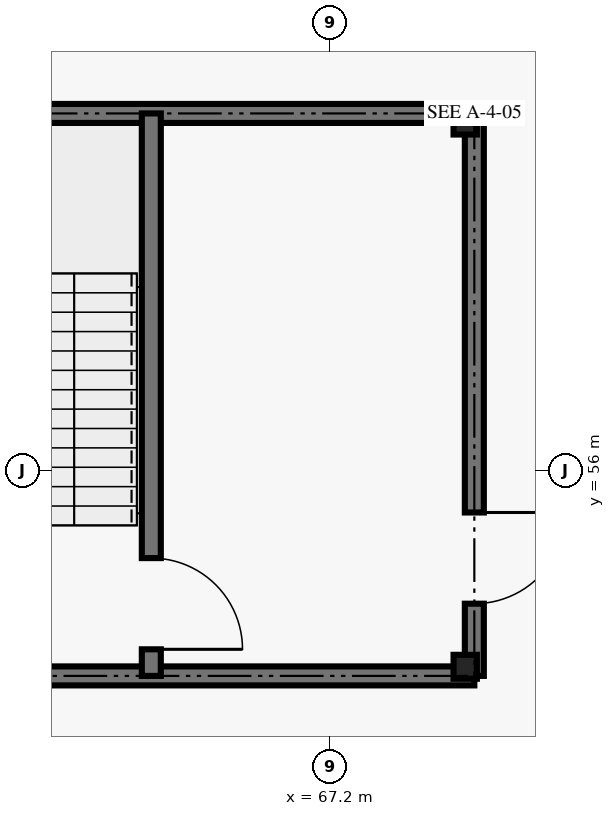
"""IFC4 building model, lengths in metres.
Left out: names, types, materials, properties, quantities, classifications, styles, units other than length and angle.
Written with IfcOpenShell. Run it as: python <this file> out.ifc"""

import sys

from ifc_helpers import new_model, si_unit, direction, frame, frame_2d, origin, origin_2d, place, context, subcontext, project, spatial, rectangle, i_section, extrude, element, fill, save


model = new_model("IFC4")
c1 = context("Model", 3, precision=1e-05, world=origin(), true_north=direction((0.0, 1.0)))
c2 = subcontext(c1, "Body", "Model", "MODEL_VIEW")
j1 = project(units=[si_unit("LENGTHUNIT", "METRE"), si_unit("PLANEANGLEUNIT", "RADIAN")], contexts=[c1])
p1 = place(None, origin())
s1 = spatial("IfcSite", under=j1, at=p1, CompositionType="ELEMENT")
p2 = place(p1, origin())
s2 = spatial("IfcBuilding", under=s1, at=p2, CompositionType="ELEMENT")
p3 = place(p2, frame((0.0, 0.0, 5.4)))
s3 = spatial("IfcBuildingStorey", under=s2, at=p3, CompositionType="ELEMENT", Elevation=5.4)
for number, where, z_axis, x_axis in (
    (1, (68.98, 53.42, 0.0), (0.0, 0.0, 1.0), (1.0, 0.0, 0.0)),
    (2, (68.98, 60.58, 0.0), (0.0, 0.0, 1.0), (1.0, 0.0, 0.0)),
):
    element("IfcColumn", number, at=place(p3, frame(where, z_axis=z_axis, x_axis=x_axis)), inside=s3, PredefinedType="COLUMN", context=c2, shape_type="SweptSolid", body=[
        extrude(i_section(OverallWidth=0.307, OverallDepth=0.315, WebThickness=0.012, FlangeThickness=0.019, FilletRadius=0.017, at=origin_2d()), origin(), (0.0, 0.0, 1.0), 4.8),
    ])
for number, where, z_axis, x_axis in (
    (3, (59.9, 60.7, 0.0), (0.0, 0.0, 1.0), (1.0, 0.0, 0.0)),
    (4, (69.1, 53.3, 0.0), (0.0, 0.0, 1.0), (-1.0, 0.0, 0.0)),
):
    element("IfcWall", number, at=place(p3, frame(where, z_axis=z_axis, x_axis=x_axis)), inside=s3, PredefinedType="SHEAR", context=c2, shape_type="SweptSolid", body=[
        extrude(rectangle(XDim=9.2, YDim=0.25, at=frame_2d((4.6, 0.0))), origin(), (0.0, 0.0, 1.0), 4.56),
    ])
p4 = place(p3, frame((69.1, 60.7, 0.0), z_axis=(0.0, 0.0, 1.0), x_axis=(0.0, -1.0, 0.0)))
e5 = element("IfcWall", 5, at=p4, inside=s3, PredefinedType="SHEAR", context=c2, shape_type="SweptSolid", body=[
    extrude(rectangle(XDim=7.4, YDim=0.25, at=frame_2d((3.7, 0.0))), origin(), (0.0, 0.0, 1.0), 4.56),
])
p5 = place(p4, frame((5.25, 0.0, 0.0)))
e6 = element("IfcOpeningElement", 6, at=p5, cuts=e5, PredefinedType="OPENING", context=c2, shape_type="SweptSolid", body=[
    extrude(rectangle(XDim=1.2, YDim=2.2, at=frame_2d((0.6, 1.1))), frame((0.0, 0.135, 0.0), z_axis=(0.0, -1.0, 0.0), x_axis=(1.0, 0.0, 0.0)), (0.0, 0.0, 1.0), 0.27),
])
p6 = place(p3, frame((64.85, 60.7, 0.0), z_axis=(0.0, 0.0, 1.0), x_axis=(0.0, -1.0, 0.0)))
e7 = element("IfcWall", 7, at=p6, inside=s3, PredefinedType="SHEAR", context=c2, shape_type="SweptSolid", body=[
    extrude(rectangle(XDim=7.4, YDim=0.25, at=frame_2d((3.7, 0.0))), origin(), (0.0, 0.0, 1.0), 4.56),
])
p7 = place(p6, frame((5.85, 0.0, 0.0)))
e8 = element("IfcOpeningElement", 8, at=p7, cuts=e7, PredefinedType="OPENING", context=c2, shape_type="SweptSolid", body=[
    extrude(rectangle(XDim=1.2, YDim=2.2, at=frame_2d((0.6, 1.1))), frame((0.0, 0.135, 0.0), z_axis=(0.0, -1.0, 0.0), x_axis=(1.0, 0.0, 0.0)), (0.0, 0.0, 1.0), 0.27),
])
p8 = place(p5, origin())
e9 = element("IfcDoor", 9, at=p8, inside=s3, OperationType="SINGLE_SWING_LEFT", PredefinedType="DOOR", context=c2, shape_type="SweptSolid", body=[
    extrude(rectangle(XDim=1.2, YDim=2.2, at=frame_2d((0.6, 1.1))), frame((0.0, 0.025, 0.0), z_axis=(0.0, -1.0, 0.0), x_axis=(1.0, 0.0, 0.0)), (0.0, 0.0, 1.0), 0.05),
])
fill(e6, e9)
p9 = place(p7, origin())
e10 = element("IfcDoor", 10, at=p9, inside=s3, OperationType="SINGLE_SWING_RIGHT", PredefinedType="DOOR", context=c2, shape_type="SweptSolid", body=[
    extrude(rectangle(XDim=1.2, YDim=2.2, at=frame_2d((0.6, 1.1))), frame((0.0, 0.025, 0.0), z_axis=(0.0, -1.0, 0.0), x_axis=(1.0, 0.0, 0.0)), (0.0, 0.0, 1.0), 0.05),
])
fill(e8, e10)
save(model, sys.argv[1])
